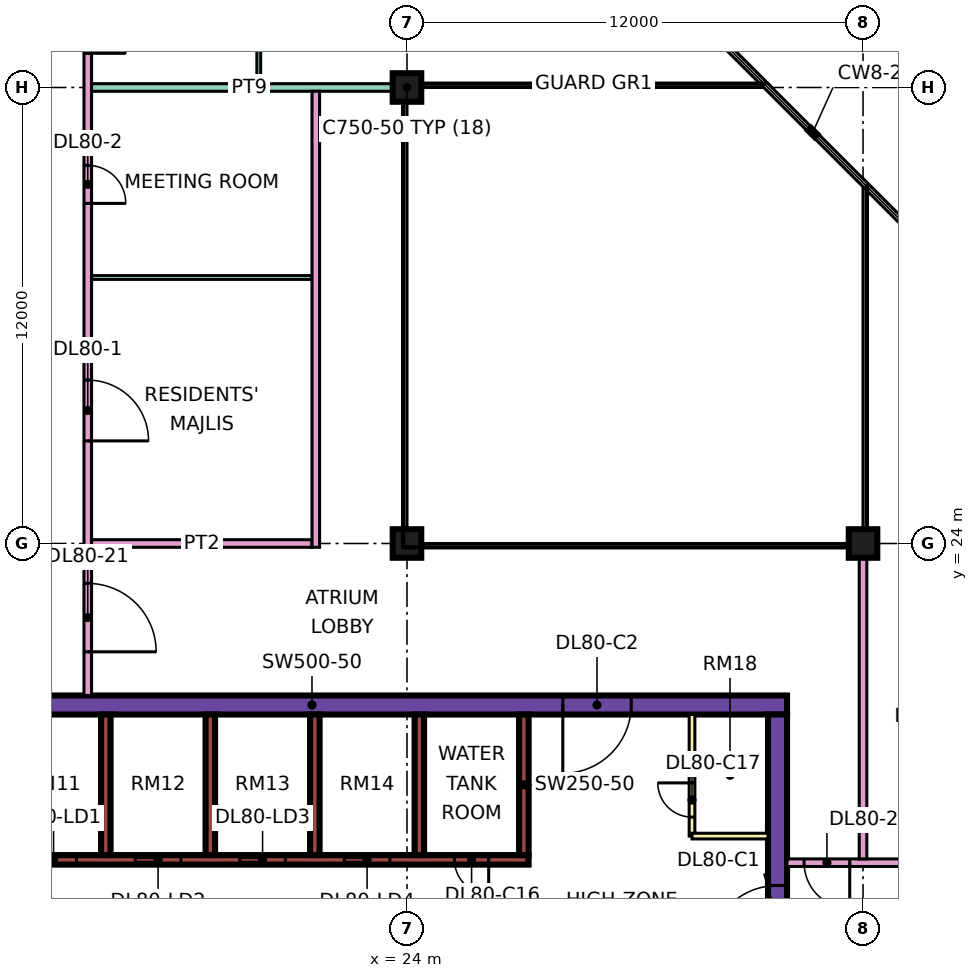
"""IFC4 building model, lengths in metres.
Left out: names, types, materials, properties, quantities, classifications, styles, units other than length and angle.
Written with IfcOpenShell. Run it as: python <this file> out.ifc"""

import sys

from ifc_helpers import new_model, si_unit, direction, frame, frame_2d, origin, origin_2d, place, context, subcontext, project, spatial, rectangle, extrude, element, fill, save


model = new_model("IFC4")
c1 = context("Model", 3, precision=1e-05, world=origin(), true_north=direction((0.0, 1.0)))
c2 = subcontext(c1, "Body", "Model", "MODEL_VIEW")
j1 = project(units=[si_unit("LENGTHUNIT", "METRE"), si_unit("PLANEANGLEUNIT", "RADIAN")], contexts=[c1])
p1 = place(None, origin())
s1 = spatial("IfcSite", under=j1, at=p1, CompositionType="ELEMENT")
p2 = place(p1, origin())
s2 = spatial("IfcBuilding", under=s1, at=p2, CompositionType="ELEMENT")
p3 = place(p2, frame((0.0, 0.0, 346.4)))
s3 = spatial("IfcBuildingStorey", under=s2, at=p3, CompositionType="ELEMENT", Elevation=346.4)
for number, where, z_axis, x_axis in (
    (1, (24.0, 24.0, 0.0), (0.0, 0.0, 1.0), (1.0, 0.0, 0.0)),
    (2, (24.0, 36.0, 0.0), (0.0, 0.0, 1.0), (1.0, 0.0, 0.0)),
    (3, (36.0, 24.0, 0.0), (0.0, 0.0, 1.0), (1.0, 0.0, 0.0)),
):
    element("IfcColumn", number, at=place(p3, frame(where, z_axis=z_axis, x_axis=x_axis)), inside=s3, PredefinedType="COLUMN", context=c2, shape_type="SweptSolid", body=[
        extrude(rectangle(XDim=0.75, YDim=0.75, at=origin_2d()), origin(), (0.0, 0.0, 1.0), 3.75),
    ])
p4 = place(p3, frame((9.0, 19.75, 0.0), z_axis=(0.0, 0.0, 1.0), x_axis=(1.0, 0.0, 0.0)))
e4 = element("IfcWall", 4, at=p4, inside=s3, PredefinedType="SHEAR", context=c2, shape_type="SweptSolid", body=[
    extrude(rectangle(XDim=25.0, YDim=0.5, at=frame_2d((12.5, 0.0))), origin(), (0.0, 0.0, 1.0), 3.75),
])
p5 = place(p4, frame((19.1, 0.0, 0.0)))
e5 = element("IfcOpeningElement", 5, at=p5, cuts=e4, PredefinedType="OPENING", context=c2, shape_type="SweptSolid", body=[
    extrude(rectangle(XDim=1.8, YDim=2.4, at=frame_2d((0.9, 1.2))), frame((0.0, 0.26, 0.0), z_axis=(0.0, -1.0, 0.0), x_axis=(1.0, 0.0, 0.0)), (0.0, 0.0, 1.0), 0.52),
])
p6 = place(p3, frame((33.75, 7.5, 0.0), z_axis=(0.0, 0.0, 1.0), x_axis=(0.0, 1.0, 0.0)))
e6 = element("IfcWall", 6, at=p6, inside=s3, PredefinedType="SHEAR", context=c2, shape_type="SweptSolid", body=[
    extrude(rectangle(XDim=12.0, YDim=0.5, at=frame_2d((6.0, 0.0))), origin(), (0.0, 0.0, 1.0), 3.75),
])
p7 = place(p6, frame((5.7, 0.0, 0.0)))
e7 = element("IfcOpeningElement", 7, at=p7, cuts=e6, PredefinedType="OPENING", context=c2, shape_type="SweptSolid", body=[
    extrude(rectangle(XDim=1.8, YDim=2.4, at=frame_2d((0.9, 1.2))), frame((0.0, 0.26, 0.0), z_axis=(0.0, -1.0, 0.0), x_axis=(1.0, 0.0, 0.0)), (0.0, 0.0, 1.0), 0.52),
])
p8 = place(p3, frame((13.45, 15.675, 0.0), z_axis=(0.0, 0.0, 1.0), x_axis=(1.0, 0.0, 0.0)))
e8 = element("IfcWall", 8, at=p8, inside=s3, PredefinedType="SHEAR", context=c2, shape_type="SweptSolid", body=[
    extrude(rectangle(XDim=13.75, YDim=0.25, at=frame_2d((6.875, 0.0))), origin(), (0.0, 0.0, 1.0), 3.75),
])
p9 = place(p8, frame((0.65, 0.0, 0.0)))
e9 = element("IfcOpeningElement", 9, at=p9, cuts=e8, PredefinedType="OPENING", context=c2, shape_type="SweptSolid", body=[
    extrude(rectangle(XDim=1.2, YDim=2.2, at=frame_2d((0.6, 1.1))), frame((0.0, 0.135, 0.0), z_axis=(0.0, -1.0, 0.0), x_axis=(1.0, 0.0, 0.0)), (0.0, 0.0, 1.0), 0.27),
])
p10 = place(p8, frame((3.4, 0.0, 0.0)))
e10 = element("IfcOpeningElement", 10, at=p10, cuts=e8, PredefinedType="OPENING", context=c2, shape_type="SweptSolid", body=[
    extrude(rectangle(XDim=1.2, YDim=2.2, at=frame_2d((0.6, 1.1))), frame((0.0, 0.135, 0.0), z_axis=(0.0, -1.0, 0.0), x_axis=(1.0, 0.0, 0.0)), (0.0, 0.0, 1.0), 0.27),
])
p11 = place(p8, frame((6.15, 0.0, 0.0)))
e11 = element("IfcOpeningElement", 11, at=p11, cuts=e8, PredefinedType="OPENING", context=c2, shape_type="SweptSolid", body=[
    extrude(rectangle(XDim=1.2, YDim=2.2, at=frame_2d((0.6, 1.1))), frame((0.0, 0.135, 0.0), z_axis=(0.0, -1.0, 0.0), x_axis=(1.0, 0.0, 0.0)), (0.0, 0.0, 1.0), 0.27),
])
p12 = place(p8, frame((8.9, 0.0, 0.0)))
e12 = element("IfcOpeningElement", 12, at=p12, cuts=e8, PredefinedType="OPENING", context=c2, shape_type="SweptSolid", body=[
    extrude(rectangle(XDim=1.2, YDim=2.2, at=frame_2d((0.6, 1.1))), frame((0.0, 0.135, 0.0), z_axis=(0.0, -1.0, 0.0), x_axis=(1.0, 0.0, 0.0)), (0.0, 0.0, 1.0), 0.27),
])
p13 = place(p8, frame((11.8, 0.0, 0.0)))
e13 = element("IfcOpeningElement", 13, at=p13, cuts=e8, PredefinedType="OPENING", context=c2, shape_type="SweptSolid", body=[
    extrude(rectangle(XDim=0.9, YDim=2.1, at=frame_2d((0.45, 1.05))), frame((0.0, 0.135, 0.0), z_axis=(0.0, -1.0, 0.0), x_axis=(1.0, 0.0, 0.0)), (0.0, 0.0, 1.0), 0.27),
])
for number, where, z_axis, x_axis in (
    (14, (16.075, 15.8, 0.0), (0.0, 0.0, 1.0), (0.0, 1.0, 0.0)),
    (15, (18.825, 15.8, 0.0), (0.0, 0.0, 1.0), (0.0, 1.0, 0.0)),
    (16, (21.575, 15.8, 0.0), (0.0, 0.0, 1.0), (0.0, 1.0, 0.0)),
    (17, (24.325, 15.8, 0.0), (0.0, 0.0, 1.0), (0.0, 1.0, 0.0)),
    (18, (27.075, 15.8, 0.0), (0.0, 0.0, 1.0), (0.0, 1.0, 0.0)),
):
    element("IfcWall", number, at=place(p3, frame(where, z_axis=z_axis, x_axis=x_axis)), inside=s3, PredefinedType="SHEAR", context=c2, shape_type="SweptSolid", body=[
        extrude(rectangle(XDim=3.7, YDim=0.25, at=frame_2d((1.85, 0.0))), origin(), (0.0, 0.0, 1.0), 3.75),
    ])
p14 = place(p3, frame((31.5, 16.3, 0.0), z_axis=(0.0, 0.0, 1.0), x_axis=(0.0, 1.0, 0.0)))
e19 = element("IfcWall", 19, at=p14, inside=s3, PredefinedType="PARTITIONING", context=c2, shape_type="SweptSolid", body=[
    extrude(rectangle(XDim=3.2, YDim=0.15, at=frame_2d((1.6, 0.0))), origin(), (0.0, 0.0, 1.0), 3.35),
])
p15 = place(p14, frame((0.5, 0.0, 0.0)))
e20 = element("IfcOpeningElement", 20, at=p15, cuts=e19, PredefinedType="OPENING", context=c2, shape_type="SweptSolid", body=[
    extrude(rectangle(XDim=0.9, YDim=2.1, at=frame_2d((0.45, 1.05))), frame((0.0, 0.085, 0.0), z_axis=(0.0, -1.0, 0.0), x_axis=(1.0, 0.0, 0.0)), (0.0, 0.0, 1.0), 0.17),
])
p16 = place(p3, frame((31.5, 16.3, 0.0), z_axis=(0.0, 0.0, 1.0), x_axis=(1.0, 0.0, 0.0)))
e21 = element("IfcWall", 21, at=p16, inside=s3, PredefinedType="PARTITIONING", context=c2, shape_type="SweptSolid", body=[
    extrude(rectangle(XDim=2.0, YDim=0.15, at=frame_2d((1.0, 0.0))), origin(), (0.0, 0.0, 1.0), 3.35),
])
p17 = place(p3, frame((15.6, 20.0, 0.0), z_axis=(0.0, 0.0, 1.0), x_axis=(0.0, 1.0, 0.0)))
e22 = element("IfcWall", 22, at=p17, inside=s3, PredefinedType="PARTITIONING", context=c2, shape_type="SweptSolid", body=[
    extrude(rectangle(XDim=27.775, YDim=0.2, at=frame_2d((13.887, 0.0))), origin(), (0.0, 0.0, 1.0), 3.35),
])
p18 = place(p17, frame((6.7, 0.0, 0.0)))
e23 = element("IfcOpeningElement", 23, at=p18, cuts=e22, PredefinedType="OPENING", context=c2, shape_type="SweptSolid", body=[
    extrude(rectangle(XDim=1.6, YDim=2.1, at=frame_2d((0.8, 1.05))), frame((0.0, 0.11, 0.0), z_axis=(0.0, -1.0, 0.0), x_axis=(1.0, 0.0, 0.0)), (0.0, 0.0, 1.0), 0.22),
])
p19 = place(p17, frame((12.95, 0.0, 0.0)))
e24 = element("IfcOpeningElement", 24, at=p19, cuts=e22, PredefinedType="OPENING", context=c2, shape_type="SweptSolid", body=[
    extrude(rectangle(XDim=1.0, YDim=2.1, at=frame_2d((0.5, 1.05))), frame((0.0, 0.11, 0.0), z_axis=(0.0, -1.0, 0.0), x_axis=(1.0, 0.0, 0.0)), (0.0, 0.0, 1.0), 0.22),
])
p20 = place(p17, frame((16.9, 0.0, 0.0)))
e25 = element("IfcOpeningElement", 25, at=p20, cuts=e22, PredefinedType="OPENING", context=c2, shape_type="SweptSolid", body=[
    extrude(rectangle(XDim=1.0, YDim=2.1, at=frame_2d((0.5, 1.05))), frame((0.0, 0.11, 0.0), z_axis=(0.0, -1.0, 0.0), x_axis=(1.0, 0.0, 0.0)), (0.0, 0.0, 1.0), 0.22),
])
p21 = place(p17, frame((1.15, 0.0, 0.0)))
e26 = element("IfcOpeningElement", 26, at=p21, cuts=e22, PredefinedType="OPENING", context=c2, shape_type="SweptSolid", body=[
    extrude(rectangle(XDim=1.8, YDim=2.1, at=frame_2d((0.9, 1.05))), frame((0.0, 0.11, 0.0), z_axis=(0.0, -1.0, 0.0), x_axis=(1.0, 0.0, 0.0)), (0.0, 0.0, 1.0), 0.22),
])
p22 = place(p17, frame((25.9, 0.0, 0.0)))
e27 = element("IfcOpeningElement", 27, at=p22, cuts=e22, PredefinedType="OPENING", context=c2, shape_type="SweptSolid", body=[
    extrude(rectangle(XDim=1.0, YDim=2.1, at=frame_2d((0.5, 1.05))), frame((0.0, 0.11, 0.0), z_axis=(0.0, -1.0, 0.0), x_axis=(1.0, 0.0, 0.0)), (0.0, 0.0, 1.0), 0.22),
])
p23 = place(p3, frame((15.7, 24.0, 0.0), z_axis=(0.0, 0.0, 1.0), x_axis=(1.0, 0.0, 0.0)))
e28 = element("IfcWall", 28, at=p23, inside=s3, PredefinedType="PARTITIONING", context=c2, shape_type="SweptSolid", body=[
    extrude(rectangle(XDim=5.8, YDim=0.2, at=frame_2d((2.9, 0.0))), origin(), (0.0, 0.0, 1.0), 3.35),
])
p24 = place(p3, frame((15.7, 31.0, 0.0), z_axis=(0.0, 0.0, 1.0), x_axis=(1.0, 0.0, 0.0)))
e29 = element("IfcWall", 29, at=p24, inside=s3, PredefinedType="PARTITIONING", context=c2, shape_type="SweptSolid", body=[
    extrude(rectangle(XDim=5.8, YDim=0.1, at=frame_2d((2.9, 0.0))), origin(), (0.0, 0.0, 1.0), 3.35),
])
p25 = place(p3, frame((15.7, 36.0, 0.0), z_axis=(0.0, 0.0, 1.0), x_axis=(1.0, 0.0, 0.0)))
e30 = element("IfcWall", 30, at=p25, inside=s3, PredefinedType="PARTITIONING", context=c2, shape_type="SweptSolid", body=[
    extrude(rectangle(XDim=8.3, YDim=0.2, at=frame_2d((4.15, 0.0))), origin(), (0.0, 0.0, 1.0), 3.35),
])
p26 = place(p3, frame((20.1, 36.1, 0.0), z_axis=(0.0, 0.0, 1.0), x_axis=(0.0, 1.0, 0.0)))
e31 = element("IfcWall", 31, at=p26, inside=s3, PredefinedType="PARTITIONING", context=c2, shape_type="SweptSolid", body=[
    extrude(rectangle(XDim=5.95, YDim=0.1, at=frame_2d((2.975, 0.0))), origin(), (0.0, 0.0, 1.0), 3.35),
])
p27 = place(p26, frame((0.95, 0.0, 0.0)))
e32 = element("IfcOpeningElement", 32, at=p27, cuts=e31, PredefinedType="OPENING", context=c2, shape_type="SweptSolid", body=[
    extrude(rectangle(XDim=0.9, YDim=2.1, at=frame_2d((0.45, 1.05))), frame((0.0, 0.06, 0.0), z_axis=(0.0, -1.0, 0.0), x_axis=(1.0, 0.0, 0.0)), (0.0, 0.0, 1.0), 0.12),
])
p28 = place(p26, frame((3.95, 0.0, 0.0)))
e33 = element("IfcOpeningElement", 33, at=p28, cuts=e31, PredefinedType="OPENING", context=c2, shape_type="SweptSolid", body=[
    extrude(rectangle(XDim=0.9, YDim=2.1, at=frame_2d((0.45, 1.05))), frame((0.0, 0.06, 0.0), z_axis=(0.0, -1.0, 0.0), x_axis=(1.0, 0.0, 0.0)), (0.0, 0.0, 1.0), 0.12),
])
p29 = place(p3, frame((21.6, 23.9, 0.0), z_axis=(0.0, 0.0, 1.0), x_axis=(0.0, 1.0, 0.0)))
e34 = element("IfcWall", 34, at=p29, inside=s3, PredefinedType="PARTITIONING", context=c2, shape_type="SweptSolid", body=[
    extrude(rectangle(XDim=12.0, YDim=0.2, at=frame_2d((6.0, 0.0))), origin(), (0.0, 0.0, 1.0), 3.35),
])
p30 = place(p3, frame((34.0, 15.6, 0.0), z_axis=(0.0, 0.0, 1.0), x_axis=(1.0, 0.0, 0.0)))
e35 = element("IfcWall", 35, at=p30, inside=s3, PredefinedType="PARTITIONING", context=c2, shape_type="SweptSolid", body=[
    extrude(rectangle(XDim=10.35, YDim=0.2, at=frame_2d((5.175, 0.0))), origin(), (0.0, 0.0, 1.0), 3.35),
])
p31 = place(p30, frame((5.6, 0.0, 0.0)))
e36 = element("IfcOpeningElement", 36, at=p31, cuts=e35, PredefinedType="OPENING", context=c2, shape_type="SweptSolid", body=[
    extrude(rectangle(XDim=1.0, YDim=2.1, at=frame_2d((0.5, 1.05))), frame((0.0, 0.11, 0.0), z_axis=(0.0, -1.0, 0.0), x_axis=(1.0, 0.0, 0.0)), (0.0, 0.0, 1.0), 0.22),
])
p32 = place(p30, frame((0.45, 0.0, 0.0)))
e37 = element("IfcOpeningElement", 37, at=p32, cuts=e35, PredefinedType="OPENING", context=c2, shape_type="SweptSolid", body=[
    extrude(rectangle(XDim=1.2, YDim=2.1, at=frame_2d((0.6, 1.05))), frame((0.0, 0.11, 0.0), z_axis=(0.0, -1.0, 0.0), x_axis=(1.0, 0.0, 0.0)), (0.0, 0.0, 1.0), 0.22),
])
p33 = place(p3, frame((36.0, 15.7, 0.0), z_axis=(0.0, 0.0, 1.0), x_axis=(0.0, 1.0, 0.0)))
e38 = element("IfcWall", 38, at=p33, inside=s3, PredefinedType="PARTITIONING", context=c2, shape_type="SweptSolid", body=[
    extrude(rectangle(XDim=8.3, YDim=0.2, at=frame_2d((4.15, 0.0))), origin(), (0.0, 0.0, 1.0), 3.35),
])
p34 = place(p9, origin())
e39 = element("IfcDoor", 39, at=p34, inside=s3, OperationType="DOUBLE_DOOR_SLIDING", PredefinedType="DOOR", context=c2, shape_type="SweptSolid", body=[
    extrude(rectangle(XDim=1.2, YDim=2.2, at=frame_2d((0.6, 1.1))), frame((0.0, 0.025, 0.0), z_axis=(0.0, -1.0, 0.0), x_axis=(1.0, 0.0, 0.0)), (0.0, 0.0, 1.0), 0.05),
])
fill(e9, e39)
p35 = place(p10, origin())
e40 = element("IfcDoor", 40, at=p35, inside=s3, OperationType="DOUBLE_DOOR_SLIDING", PredefinedType="DOOR", context=c2, shape_type="SweptSolid", body=[
    extrude(rectangle(XDim=1.2, YDim=2.2, at=frame_2d((0.6, 1.1))), frame((0.0, 0.025, 0.0), z_axis=(0.0, -1.0, 0.0), x_axis=(1.0, 0.0, 0.0)), (0.0, 0.0, 1.0), 0.05),
])
fill(e10, e40)
p36 = place(p11, origin())
e41 = element("IfcDoor", 41, at=p36, inside=s3, OperationType="DOUBLE_DOOR_SLIDING", PredefinedType="DOOR", context=c2, shape_type="SweptSolid", body=[
    extrude(rectangle(XDim=1.2, YDim=2.2, at=frame_2d((0.6, 1.1))), frame((0.0, 0.025, 0.0), z_axis=(0.0, -1.0, 0.0), x_axis=(1.0, 0.0, 0.0)), (0.0, 0.0, 1.0), 0.05),
])
fill(e11, e41)
p37 = place(p12, origin())
e42 = element("IfcDoor", 42, at=p37, inside=s3, OperationType="DOUBLE_DOOR_SLIDING", PredefinedType="DOOR", context=c2, shape_type="SweptSolid", body=[
    extrude(rectangle(XDim=1.2, YDim=2.2, at=frame_2d((0.6, 1.1))), frame((0.0, 0.025, 0.0), z_axis=(0.0, -1.0, 0.0), x_axis=(1.0, 0.0, 0.0)), (0.0, 0.0, 1.0), 0.05),
])
fill(e12, e42)
p38 = place(p7, origin())
e43 = element("IfcDoor", 43, at=p38, inside=s3, OperationType="DOUBLE_DOOR_SINGLE_SWING", PredefinedType="DOOR", context=c2, shape_type="SweptSolid", body=[
    extrude(rectangle(XDim=1.8, YDim=2.4, at=frame_2d((0.9, 1.2))), frame((0.0, 0.025, 0.0), z_axis=(0.0, -1.0, 0.0), x_axis=(1.0, 0.0, 0.0)), (0.0, 0.0, 1.0), 0.05),
])
fill(e7, e43)
p39 = place(p5, frame((1.8, 0.0, 0.0), z_axis=(0.0, 0.0, 1.0), x_axis=(-1.0, 0.0, 0.0)))
e44 = element("IfcDoor", 44, at=p39, inside=s3, OperationType="DOUBLE_DOOR_SINGLE_SWING", PredefinedType="DOOR", context=c2, shape_type="SweptSolid", body=[
    extrude(rectangle(XDim=1.8, YDim=2.4, at=frame_2d((0.9, 1.2))), frame((0.0, 0.025, 0.0), z_axis=(0.0, -1.0, 0.0), x_axis=(1.0, 0.0, 0.0)), (0.0, 0.0, 1.0), 0.05),
])
fill(e5, e44)
p40 = place(p13, origin())
e45 = element("IfcDoor", 45, at=p40, inside=s3, OperationType="SINGLE_SWING_RIGHT", PredefinedType="DOOR", context=c2, shape_type="SweptSolid", body=[
    extrude(rectangle(XDim=0.9, YDim=2.1, at=frame_2d((0.45, 1.05))), frame((0.0, 0.025, 0.0), z_axis=(0.0, -1.0, 0.0), x_axis=(1.0, 0.0, 0.0)), (0.0, 0.0, 1.0), 0.05),
])
fill(e13, e45)
p41 = place(p15, frame((0.9, 0.0, 0.0), z_axis=(0.0, 0.0, 1.0), x_axis=(-1.0, 0.0, 0.0)))
e46 = element("IfcDoor", 46, at=p41, inside=s3, OperationType="SINGLE_SWING_RIGHT", PredefinedType="DOOR", context=c2, shape_type="SweptSolid", body=[
    extrude(rectangle(XDim=0.9, YDim=2.1, at=frame_2d((0.45, 1.05))), frame((0.0, 0.025, 0.0), z_axis=(0.0, -1.0, 0.0), x_axis=(1.0, 0.0, 0.0)), (0.0, 0.0, 1.0), 0.05),
])
fill(e20, e46)
p42 = place(p18, frame((1.6, 0.0, 0.0), z_axis=(0.0, 0.0, 1.0), x_axis=(-1.0, 0.0, 0.0)))
e47 = element("IfcDoor", 47, at=p42, inside=s3, OperationType="DOUBLE_DOOR_SINGLE_SWING", PredefinedType="DOOR", context=c2, shape_type="SweptSolid", body=[
    extrude(rectangle(XDim=1.6, YDim=2.1, at=frame_2d((0.8, 1.05))), frame((0.0, 0.025, 0.0), z_axis=(0.0, -1.0, 0.0), x_axis=(1.0, 0.0, 0.0)), (0.0, 0.0, 1.0), 0.05),
])
fill(e23, e47)
p43 = place(p19, frame((1.0, 0.0, 0.0), z_axis=(0.0, 0.0, 1.0), x_axis=(-1.0, 0.0, 0.0)))
e48 = element("IfcDoor", 48, at=p43, inside=s3, OperationType="SINGLE_SWING_LEFT", PredefinedType="DOOR", context=c2, shape_type="SweptSolid", body=[
    extrude(rectangle(XDim=1.0, YDim=2.1, at=frame_2d((0.5, 1.05))), frame((0.0, 0.025, 0.0), z_axis=(0.0, -1.0, 0.0), x_axis=(1.0, 0.0, 0.0)), (0.0, 0.0, 1.0), 0.05),
])
fill(e24, e48)
p44 = place(p20, frame((1.0, 0.0, 0.0), z_axis=(0.0, 0.0, 1.0), x_axis=(-1.0, 0.0, 0.0)))
e49 = element("IfcDoor", 49, at=p44, inside=s3, OperationType="SINGLE_SWING_LEFT", PredefinedType="DOOR", context=c2, shape_type="SweptSolid", body=[
    extrude(rectangle(XDim=1.0, YDim=2.1, at=frame_2d((0.5, 1.05))), frame((0.0, 0.025, 0.0), z_axis=(0.0, -1.0, 0.0), x_axis=(1.0, 0.0, 0.0)), (0.0, 0.0, 1.0), 0.05),
])
fill(e25, e49)
p45 = place(p32, origin())
e50 = element("IfcDoor", 50, at=p45, inside=s3, OperationType="SINGLE_SWING_RIGHT", PredefinedType="DOOR", context=c2, shape_type="SweptSolid", body=[
    extrude(rectangle(XDim=1.2, YDim=2.1, at=frame_2d((0.6, 1.05))), frame((0.0, 0.025, 0.0), z_axis=(0.0, -1.0, 0.0), x_axis=(1.0, 0.0, 0.0)), (0.0, 0.0, 1.0), 0.05),
])
fill(e37, e50)
p46 = place(p21, frame((1.8, 0.0, 0.0), z_axis=(0.0, 0.0, 1.0), x_axis=(-1.0, 0.0, 0.0)))
e51 = element("IfcDoor", 51, at=p46, inside=s3, OperationType="DOUBLE_DOOR_SINGLE_SWING", PredefinedType="DOOR", context=c2, shape_type="SweptSolid", body=[
    extrude(rectangle(XDim=1.8, YDim=2.1, at=frame_2d((0.9, 1.05))), frame((0.0, 0.025, 0.0), z_axis=(0.0, -1.0, 0.0), x_axis=(1.0, 0.0, 0.0)), (0.0, 0.0, 1.0), 0.05),
])
fill(e26, e51)
save(model, sys.argv[1])
